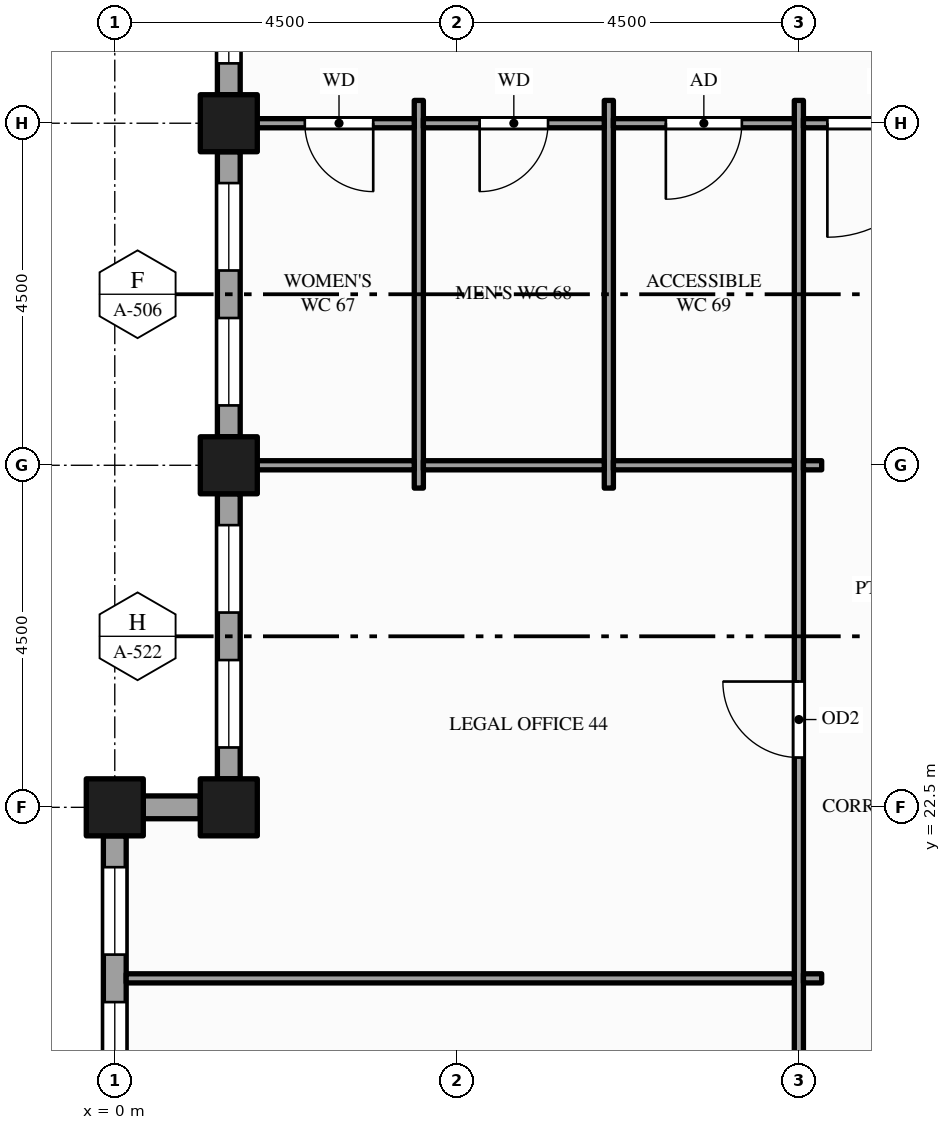
"""IFC4 building model, lengths in metres.
Left out: names, types, materials, properties, quantities, classifications, styles, units other than length and angle.
Written with IfcOpenShell. Run it as: python <this file> out.ifc"""

import sys

from ifc_helpers import new_model, si_unit, direction, frame, frame_2d, origin, origin_2d, place, context, subcontext, project, spatial, rectangle, hollow_rectangle, extrude, element, fill, save


model = new_model("IFC4")
c1 = context("Model", 3, precision=1e-05, world=origin(), true_north=direction((0.0, 1.0)))
c2 = subcontext(c1, "Body", "Model", "MODEL_VIEW")
j1 = project(units=[si_unit("LENGTHUNIT", "METRE"), si_unit("PLANEANGLEUNIT", "RADIAN")], contexts=[c1])
p1 = place(None, origin())
s1 = spatial("IfcSite", under=j1, at=p1, CompositionType="ELEMENT")
p2 = place(p1, origin())
s2 = spatial("IfcBuilding", under=s1, at=p2, CompositionType="ELEMENT")
p3 = place(p2, frame((0.0, 0.0, 235.0)))
s3 = spatial("IfcBuildingStorey", under=s2, at=p3, CompositionType="ELEMENT", Elevation=235.0)
for number, where, z_axis, x_axis in (
    (1, (0.0, 22.5, -0.15), (0.0, 0.0, 1.0), (1.0, 0.0, 0.0)),
    (2, (1.5, 22.5, -0.15), (0.0, 0.0, 1.0), (1.0, 0.0, 0.0)),
    (3, (1.5, 27.0, -0.15), (0.0, 0.0, 1.0), (1.0, 0.0, 0.0)),
    (4, (1.5, 31.5, -0.15), (0.0, 0.0, 1.0), (1.0, 0.0, 0.0)),
):
    element("IfcColumn", number, at=place(p3, frame(where, z_axis=z_axis, x_axis=x_axis)), inside=s3, PredefinedType="COLUMN", context=c2, shape_type="SweptSolid", body=[
        extrude(hollow_rectangle(XDim=0.75, YDim=0.75, WallThickness=0.036, at=origin_2d()), origin(), (0.0, 0.0, 1.0), 4.0),
    ])
p4 = place(p3, frame((1.5, 36.0, 0.0), z_axis=(0.0, 0.0, 1.0), x_axis=(0.0, -1.0, 0.0)))
e5 = element("IfcWall", 5, at=p4, inside=s3, PredefinedType="STANDARD", context=c2, shape_type="SweptSolid", body=[
    extrude(rectangle(XDim=4.125, YDim=0.3, at=frame_2d((2.062, 0.0))), origin(), (0.0, 0.0, 1.0), 3.157),
])
p5 = place(p4, frame((0.4, 0.0, 0.9)))
e6 = element("IfcOpeningElement", 6, at=p5, cuts=e5, PredefinedType="OPENING", context=c2, shape_type="SweptSolid", body=[
    extrude(rectangle(XDim=1.55, YDim=2.0, at=frame_2d((0.775, 1.0))), frame((0.0, 0.16, 0.0), z_axis=(0.0, -1.0, 0.0), x_axis=(1.0, 0.0, 0.0)), (0.0, 0.0, 1.0), 0.32),
])
p6 = place(p4, frame((2.562, 0.0, 0.9)))
e7 = element("IfcOpeningElement", 7, at=p6, cuts=e5, PredefinedType="OPENING", context=c2, shape_type="SweptSolid", body=[
    extrude(rectangle(XDim=1.15, YDim=2.0, at=frame_2d((0.575, 1.0))), frame((0.0, 0.16, 0.0), z_axis=(0.0, -1.0, 0.0), x_axis=(1.0, 0.0, 0.0)), (0.0, 0.0, 1.0), 0.32),
])
p7 = place(p3, frame((1.5, 31.125, 0.0), z_axis=(0.0, 0.0, 1.0), x_axis=(0.0, -1.0, 0.0)))
e8 = element("IfcWall", 8, at=p7, inside=s3, PredefinedType="STANDARD", context=c2, shape_type="SweptSolid", body=[
    extrude(rectangle(XDim=3.75, YDim=0.3, at=frame_2d((1.875, 0.0))), origin(), (0.0, 0.0, 1.0), 3.157),
])
p8 = place(p7, frame((0.413, 0.0, 0.9)))
e9 = element("IfcOpeningElement", 9, at=p8, cuts=e8, PredefinedType="OPENING", context=c2, shape_type="SweptSolid", body=[
    extrude(rectangle(XDim=1.15, YDim=2.0, at=frame_2d((0.575, 1.0))), frame((0.0, 0.16, 0.0), z_axis=(0.0, -1.0, 0.0), x_axis=(1.0, 0.0, 0.0)), (0.0, 0.0, 1.0), 0.32),
])
p9 = place(p7, frame((2.188, 0.0, 0.9)))
e10 = element("IfcOpeningElement", 10, at=p9, cuts=e8, PredefinedType="OPENING", context=c2, shape_type="SweptSolid", body=[
    extrude(rectangle(XDim=1.15, YDim=2.0, at=frame_2d((0.575, 1.0))), frame((0.0, 0.16, 0.0), z_axis=(0.0, -1.0, 0.0), x_axis=(1.0, 0.0, 0.0)), (0.0, 0.0, 1.0), 0.32),
])
p10 = place(p3, frame((1.5, 26.625, 0.0), z_axis=(0.0, 0.0, 1.0), x_axis=(0.0, -1.0, 0.0)))
e11 = element("IfcWall", 11, at=p10, inside=s3, PredefinedType="STANDARD", context=c2, shape_type="SweptSolid", body=[
    extrude(rectangle(XDim=3.75, YDim=0.3, at=frame_2d((1.875, 0.0))), origin(), (0.0, 0.0, 1.0), 3.157),
])
p11 = place(p10, frame((0.413, 0.0, 0.9)))
e12 = element("IfcOpeningElement", 12, at=p11, cuts=e11, PredefinedType="OPENING", context=c2, shape_type="SweptSolid", body=[
    extrude(rectangle(XDim=1.15, YDim=2.0, at=frame_2d((0.575, 1.0))), frame((0.0, 0.16, 0.0), z_axis=(0.0, -1.0, 0.0), x_axis=(1.0, 0.0, 0.0)), (0.0, 0.0, 1.0), 0.32),
])
p12 = place(p10, frame((2.188, 0.0, 0.9)))
e13 = element("IfcOpeningElement", 13, at=p12, cuts=e11, PredefinedType="OPENING", context=c2, shape_type="SweptSolid", body=[
    extrude(rectangle(XDim=1.15, YDim=2.0, at=frame_2d((0.575, 1.0))), frame((0.0, 0.16, 0.0), z_axis=(0.0, -1.0, 0.0), x_axis=(1.0, 0.0, 0.0)), (0.0, 0.0, 1.0), 0.32),
])
p13 = place(p3, frame((1.125, 22.5, 0.0), z_axis=(0.0, 0.0, 1.0), x_axis=(-1.0, 0.0, 0.0)))
e14 = element("IfcWall", 14, at=p13, inside=s3, PredefinedType="STANDARD", context=c2, shape_type="SweptSolid", body=[
    extrude(rectangle(XDim=0.75, YDim=0.3, at=frame_2d((0.375, 0.0))), origin(), (0.0, 0.0, 1.0), 3.157),
])
p14 = place(p3, frame((0.0, 22.125, 0.0), z_axis=(0.0, 0.0, 1.0), x_axis=(0.0, -1.0, 0.0)))
e15 = element("IfcWall", 15, at=p14, inside=s3, PredefinedType="STANDARD", context=c2, shape_type="SweptSolid", body=[
    extrude(rectangle(XDim=3.75, YDim=0.3, at=frame_2d((1.875, 0.0))), origin(), (0.0, 0.0, 1.0), 3.157),
])
p15 = place(p14, frame((0.413, 0.0, 0.9)))
e16 = element("IfcOpeningElement", 16, at=p15, cuts=e15, PredefinedType="OPENING", context=c2, shape_type="SweptSolid", body=[
    extrude(rectangle(XDim=1.15, YDim=2.0, at=frame_2d((0.575, 1.0))), frame((0.0, 0.16, 0.0), z_axis=(0.0, -1.0, 0.0), x_axis=(1.0, 0.0, 0.0)), (0.0, 0.0, 1.0), 0.32),
])
p16 = place(p14, frame((2.188, 0.0, 0.9)))
e17 = element("IfcOpeningElement", 17, at=p16, cuts=e15, PredefinedType="OPENING", context=c2, shape_type="SweptSolid", body=[
    extrude(rectangle(XDim=1.15, YDim=2.0, at=frame_2d((0.575, 1.0))), frame((0.0, 0.16, 0.0), z_axis=(0.0, -1.0, 0.0), x_axis=(1.0, 0.0, 0.0)), (0.0, 0.0, 1.0), 0.32),
])
for number, where, z_axis, x_axis in (
    (18, (4.0, 26.7, 0.0), (0.0, 0.0, 1.0), (0.0, 1.0, 0.0)),
    (19, (6.5, 26.7, 0.0), (0.0, 0.0, 1.0), (0.0, 1.0, 0.0)),
):
    element("IfcWall", number, at=place(p3, frame(where, z_axis=z_axis, x_axis=x_axis)), inside=s3, PredefinedType="PARTITIONING", context=c2, shape_type="SweptSolid", body=[
        extrude(rectangle(XDim=5.1, YDim=0.12, at=frame_2d((2.55, 0.0))), origin(), (0.0, 0.0, 1.0), 3.85),
    ])
p17 = place(p3, frame((9.0, 13.2, 0.0), z_axis=(0.0, 0.0, 1.0), x_axis=(0.0, 1.0, 0.0)))
e20 = element("IfcWall", 20, at=p17, inside=s3, PredefinedType="PARTITIONING", context=c2, shape_type="SweptSolid", body=[
    extrude(rectangle(XDim=18.6, YDim=0.12, at=frame_2d((9.3, 0.0))), origin(), (0.0, 0.0, 1.0), 2.6),
])
p18 = place(p17, frame((3.175, 0.0, 0.0)))
e21 = element("IfcOpeningElement", 21, at=p18, cuts=e20, PredefinedType="OPENING", context=c2, shape_type="SweptSolid", body=[
    extrude(rectangle(XDim=1.0, YDim=2.1, at=frame_2d((0.5, 1.05))), frame((0.0, 0.07, 0.0), z_axis=(0.0, -1.0, 0.0), x_axis=(1.0, 0.0, 0.0)), (0.0, 0.0, 1.0), 0.14),
])
p19 = place(p17, frame((9.955, 0.0, 0.0)))
e22 = element("IfcOpeningElement", 22, at=p19, cuts=e20, PredefinedType="OPENING", context=c2, shape_type="SweptSolid", body=[
    extrude(rectangle(XDim=1.0, YDim=2.1, at=frame_2d((0.5, 1.05))), frame((0.0, 0.07, 0.0), z_axis=(0.0, -1.0, 0.0), x_axis=(1.0, 0.0, 0.0)), (0.0, 0.0, 1.0), 0.14),
])
p20 = place(p3, frame((0.15, 20.25, 0.0), z_axis=(0.0, 0.0, 1.0), x_axis=(1.0, 0.0, 0.0)))
e23 = element("IfcWall", 23, at=p20, inside=s3, PredefinedType="PARTITIONING", context=c2, shape_type="SweptSolid", body=[
    extrude(rectangle(XDim=8.79, YDim=0.12, at=frame_2d((4.395, 0.0))), origin(), (0.0, 0.0, 1.0), 2.87),
])
p21 = place(p3, frame((9.06, 20.25, 0.0), z_axis=(0.0, 0.0, 1.0), x_axis=(1.0, 0.0, 0.0)))
e24 = element("IfcWall", 24, at=p21, inside=s3, PredefinedType="PARTITIONING", context=c2, shape_type="SweptSolid", body=[
    extrude(rectangle(XDim=0.24, YDim=0.12, at=frame_2d((0.12, 0.0))), origin(), (0.0, 0.0, 1.0), 2.87),
])
p22 = place(p3, frame((1.65, 27.0, 0.0), z_axis=(0.0, 0.0, 1.0), x_axis=(1.0, 0.0, 0.0)))
e25 = element("IfcWall", 25, at=p22, inside=s3, PredefinedType="PARTITIONING", context=c2, shape_type="SweptSolid", body=[
    extrude(rectangle(XDim=2.29, YDim=0.12, at=frame_2d((1.145, 0.0))), origin(), (0.0, 0.0, 1.0), 2.87),
])
for number, where, z_axis, x_axis in (
    (26, (4.06, 27.0, 0.0), (0.0, 0.0, 1.0), (1.0, 0.0, 0.0)),
    (27, (6.56, 27.0, 0.0), (0.0, 0.0, 1.0), (1.0, 0.0, 0.0)),
):
    element("IfcWall", number, at=place(p3, frame(where, z_axis=z_axis, x_axis=x_axis)), inside=s3, PredefinedType="PARTITIONING", context=c2, shape_type="SweptSolid", body=[
        extrude(rectangle(XDim=2.38, YDim=0.12, at=frame_2d((1.19, 0.0))), origin(), (0.0, 0.0, 1.0), 2.87),
    ])
p23 = place(p3, frame((9.06, 27.0, 0.0), z_axis=(0.0, 0.0, 1.0), x_axis=(1.0, 0.0, 0.0)))
e28 = element("IfcWall", 28, at=p23, inside=s3, PredefinedType="PARTITIONING", context=c2, shape_type="SweptSolid", body=[
    extrude(rectangle(XDim=0.24, YDim=0.12, at=frame_2d((0.12, 0.0))), origin(), (0.0, 0.0, 1.0), 2.87),
])
p24 = place(p3, frame((1.65, 31.5, 0.0), z_axis=(0.0, 0.0, 1.0), x_axis=(1.0, 0.0, 0.0)))
e29 = element("IfcWall", 29, at=p24, inside=s3, PredefinedType="PARTITIONING", context=c2, shape_type="SweptSolid", body=[
    extrude(rectangle(XDim=2.29, YDim=0.12, at=frame_2d((1.145, 0.0))), origin(), (0.0, 0.0, 1.0), 2.87),
])
p25 = place(p24, frame((0.85, 0.0, 0.0)))
e30 = element("IfcOpeningElement", 30, at=p25, cuts=e29, PredefinedType="OPENING", context=c2, shape_type="SweptSolid", body=[
    extrude(rectangle(XDim=0.9, YDim=2.1, at=frame_2d((0.45, 1.05))), frame((0.0, 0.07, 0.0), z_axis=(0.0, -1.0, 0.0), x_axis=(1.0, 0.0, 0.0)), (0.0, 0.0, 1.0), 0.14),
])
p26 = place(p3, frame((4.06, 31.5, 0.0), z_axis=(0.0, 0.0, 1.0), x_axis=(1.0, 0.0, 0.0)))
e31 = element("IfcWall", 31, at=p26, inside=s3, PredefinedType="PARTITIONING", context=c2, shape_type="SweptSolid", body=[
    extrude(rectangle(XDim=2.38, YDim=0.12, at=frame_2d((1.19, 0.0))), origin(), (0.0, 0.0, 1.0), 2.87),
])
p27 = place(p26, frame((0.74, 0.0, 0.0)))
e32 = element("IfcOpeningElement", 32, at=p27, cuts=e31, PredefinedType="OPENING", context=c2, shape_type="SweptSolid", body=[
    extrude(rectangle(XDim=0.9, YDim=2.1, at=frame_2d((0.45, 1.05))), frame((0.0, 0.07, 0.0), z_axis=(0.0, -1.0, 0.0), x_axis=(1.0, 0.0, 0.0)), (0.0, 0.0, 1.0), 0.14),
])
p28 = place(p3, frame((6.56, 31.5, 0.0), z_axis=(0.0, 0.0, 1.0), x_axis=(1.0, 0.0, 0.0)))
e33 = element("IfcWall", 33, at=p28, inside=s3, PredefinedType="PARTITIONING", context=c2, shape_type="SweptSolid", body=[
    extrude(rectangle(XDim=2.38, YDim=0.12, at=frame_2d((1.19, 0.0))), origin(), (0.0, 0.0, 1.0), 2.87),
])
p29 = place(p28, frame((0.69, 0.0, 0.0)))
e34 = element("IfcOpeningElement", 34, at=p29, cuts=e33, PredefinedType="OPENING", context=c2, shape_type="SweptSolid", body=[
    extrude(rectangle(XDim=1.0, YDim=2.1, at=frame_2d((0.5, 1.05))), frame((0.0, 0.07, 0.0), z_axis=(0.0, -1.0, 0.0), x_axis=(1.0, 0.0, 0.0)), (0.0, 0.0, 1.0), 0.14),
])
p30 = place(p3, frame((9.06, 31.5, 0.0), z_axis=(0.0, 0.0, 1.0), x_axis=(1.0, 0.0, 0.0)))
e35 = element("IfcWall", 35, at=p30, inside=s3, PredefinedType="PARTITIONING", context=c2, shape_type="SweptSolid", body=[
    extrude(rectangle(XDim=2.13, YDim=0.12, at=frame_2d((1.065, 0.0))), origin(), (0.0, 0.0, 1.0), 2.87),
])
p31 = place(p30, frame((0.315, 0.0, 0.0)))
e36 = element("IfcOpeningElement", 36, at=p31, cuts=e35, PredefinedType="OPENING", context=c2, shape_type="SweptSolid", body=[
    extrude(rectangle(XDim=1.5, YDim=2.1, at=frame_2d((0.75, 1.05))), frame((0.0, 0.07, 0.0), z_axis=(0.0, -1.0, 0.0), x_axis=(1.0, 0.0, 0.0)), (0.0, 0.0, 1.0), 0.14),
])
p32 = place(p6, origin())
e37 = element("IfcWindow", 37, at=p32, inside=s3, PartitioningType="SINGLE_PANEL", PredefinedType="WINDOW", context=c2, shape_type="SweptSolid", body=[
    extrude(rectangle(XDim=1.15, YDim=2.0, at=frame_2d((0.575, 1.0))), frame((0.0, 0.03, 0.0), z_axis=(0.0, -1.0, 0.0), x_axis=(1.0, 0.0, 0.0)), (0.0, 0.0, 1.0), 0.06),
])
fill(e7, e37)
p33 = place(p8, origin())
e38 = element("IfcWindow", 38, at=p33, inside=s3, PartitioningType="SINGLE_PANEL", PredefinedType="WINDOW", context=c2, shape_type="SweptSolid", body=[
    extrude(rectangle(XDim=1.15, YDim=2.0, at=frame_2d((0.575, 1.0))), frame((0.0, 0.03, 0.0), z_axis=(0.0, -1.0, 0.0), x_axis=(1.0, 0.0, 0.0)), (0.0, 0.0, 1.0), 0.06),
])
fill(e9, e38)
p34 = place(p9, origin())
e39 = element("IfcWindow", 39, at=p34, inside=s3, PartitioningType="SINGLE_PANEL", PredefinedType="WINDOW", context=c2, shape_type="SweptSolid", body=[
    extrude(rectangle(XDim=1.15, YDim=2.0, at=frame_2d((0.575, 1.0))), frame((0.0, 0.03, 0.0), z_axis=(0.0, -1.0, 0.0), x_axis=(1.0, 0.0, 0.0)), (0.0, 0.0, 1.0), 0.06),
])
fill(e10, e39)
p35 = place(p11, origin())
e40 = element("IfcWindow", 40, at=p35, inside=s3, PartitioningType="SINGLE_PANEL", PredefinedType="WINDOW", context=c2, shape_type="SweptSolid", body=[
    extrude(rectangle(XDim=1.15, YDim=2.0, at=frame_2d((0.575, 1.0))), frame((0.0, 0.03, 0.0), z_axis=(0.0, -1.0, 0.0), x_axis=(1.0, 0.0, 0.0)), (0.0, 0.0, 1.0), 0.06),
])
fill(e12, e40)
p36 = place(p12, origin())
e41 = element("IfcWindow", 41, at=p36, inside=s3, PartitioningType="SINGLE_PANEL", PredefinedType="WINDOW", context=c2, shape_type="SweptSolid", body=[
    extrude(rectangle(XDim=1.15, YDim=2.0, at=frame_2d((0.575, 1.0))), frame((0.0, 0.03, 0.0), z_axis=(0.0, -1.0, 0.0), x_axis=(1.0, 0.0, 0.0)), (0.0, 0.0, 1.0), 0.06),
])
fill(e13, e41)
p37 = place(p15, origin())
e42 = element("IfcWindow", 42, at=p37, inside=s3, PartitioningType="SINGLE_PANEL", PredefinedType="WINDOW", context=c2, shape_type="SweptSolid", body=[
    extrude(rectangle(XDim=1.15, YDim=2.0, at=frame_2d((0.575, 1.0))), frame((0.0, 0.03, 0.0), z_axis=(0.0, -1.0, 0.0), x_axis=(1.0, 0.0, 0.0)), (0.0, 0.0, 1.0), 0.06),
])
fill(e16, e42)
p38 = place(p16, origin())
e43 = element("IfcWindow", 43, at=p38, inside=s3, PartitioningType="SINGLE_PANEL", PredefinedType="WINDOW", context=c2, shape_type="SweptSolid", body=[
    extrude(rectangle(XDim=1.15, YDim=2.0, at=frame_2d((0.575, 1.0))), frame((0.0, 0.03, 0.0), z_axis=(0.0, -1.0, 0.0), x_axis=(1.0, 0.0, 0.0)), (0.0, 0.0, 1.0), 0.06),
])
fill(e17, e43)
p39 = place(p31, origin())
e44 = element("IfcDoor", 44, at=p39, inside=s3, OperationType="SINGLE_SWING_LEFT", PredefinedType="DOOR", context=c2, shape_type="SweptSolid", body=[
    extrude(rectangle(XDim=1.5, YDim=2.1, at=frame_2d((0.75, 1.05))), frame((0.0, 0.025, 0.0), z_axis=(0.0, -1.0, 0.0), x_axis=(1.0, 0.0, 0.0)), (0.0, 0.0, 1.0), 0.05),
])
fill(e36, e44)
p40 = place(p19, origin())
e45 = element("IfcDoor", 45, at=p40, inside=s3, OperationType="SINGLE_SWING_RIGHT", PredefinedType="DOOR", context=c2, shape_type="SweptSolid", body=[
    extrude(rectangle(XDim=1.0, YDim=2.1, at=frame_2d((0.5, 1.05))), frame((0.0, 0.025, 0.0), z_axis=(0.0, -1.0, 0.0), x_axis=(1.0, 0.0, 0.0)), (0.0, 0.0, 1.0), 0.05),
])
fill(e22, e45)
p41 = place(p25, origin())
e46 = element("IfcDoor", 46, at=p41, inside=s3, OperationType="SINGLE_SWING_RIGHT", PredefinedType="DOOR", context=c2, shape_type="SweptSolid", body=[
    extrude(rectangle(XDim=0.9, YDim=2.1, at=frame_2d((0.45, 1.05))), frame((0.0, 0.025, 0.0), z_axis=(0.0, -1.0, 0.0), x_axis=(1.0, 0.0, 0.0)), (0.0, 0.0, 1.0), 0.05),
])
fill(e30, e46)
p42 = place(p27, origin())
e47 = element("IfcDoor", 47, at=p42, inside=s3, OperationType="SINGLE_SWING_LEFT", PredefinedType="DOOR", context=c2, shape_type="SweptSolid", body=[
    extrude(rectangle(XDim=0.9, YDim=2.1, at=frame_2d((0.45, 1.05))), frame((0.0, 0.025, 0.0), z_axis=(0.0, -1.0, 0.0), x_axis=(1.0, 0.0, 0.0)), (0.0, 0.0, 1.0), 0.05),
])
fill(e32, e47)
p43 = place(p29, origin())
e48 = element("IfcDoor", 48, at=p43, inside=s3, OperationType="SINGLE_SWING_LEFT", PredefinedType="DOOR", context=c2, shape_type="SweptSolid", body=[
    extrude(rectangle(XDim=1.0, YDim=2.1, at=frame_2d((0.5, 1.05))), frame((0.0, 0.025, 0.0), z_axis=(0.0, -1.0, 0.0), x_axis=(1.0, 0.0, 0.0)), (0.0, 0.0, 1.0), 0.05),
])
fill(e34, e48)
save(model, sys.argv[1])
